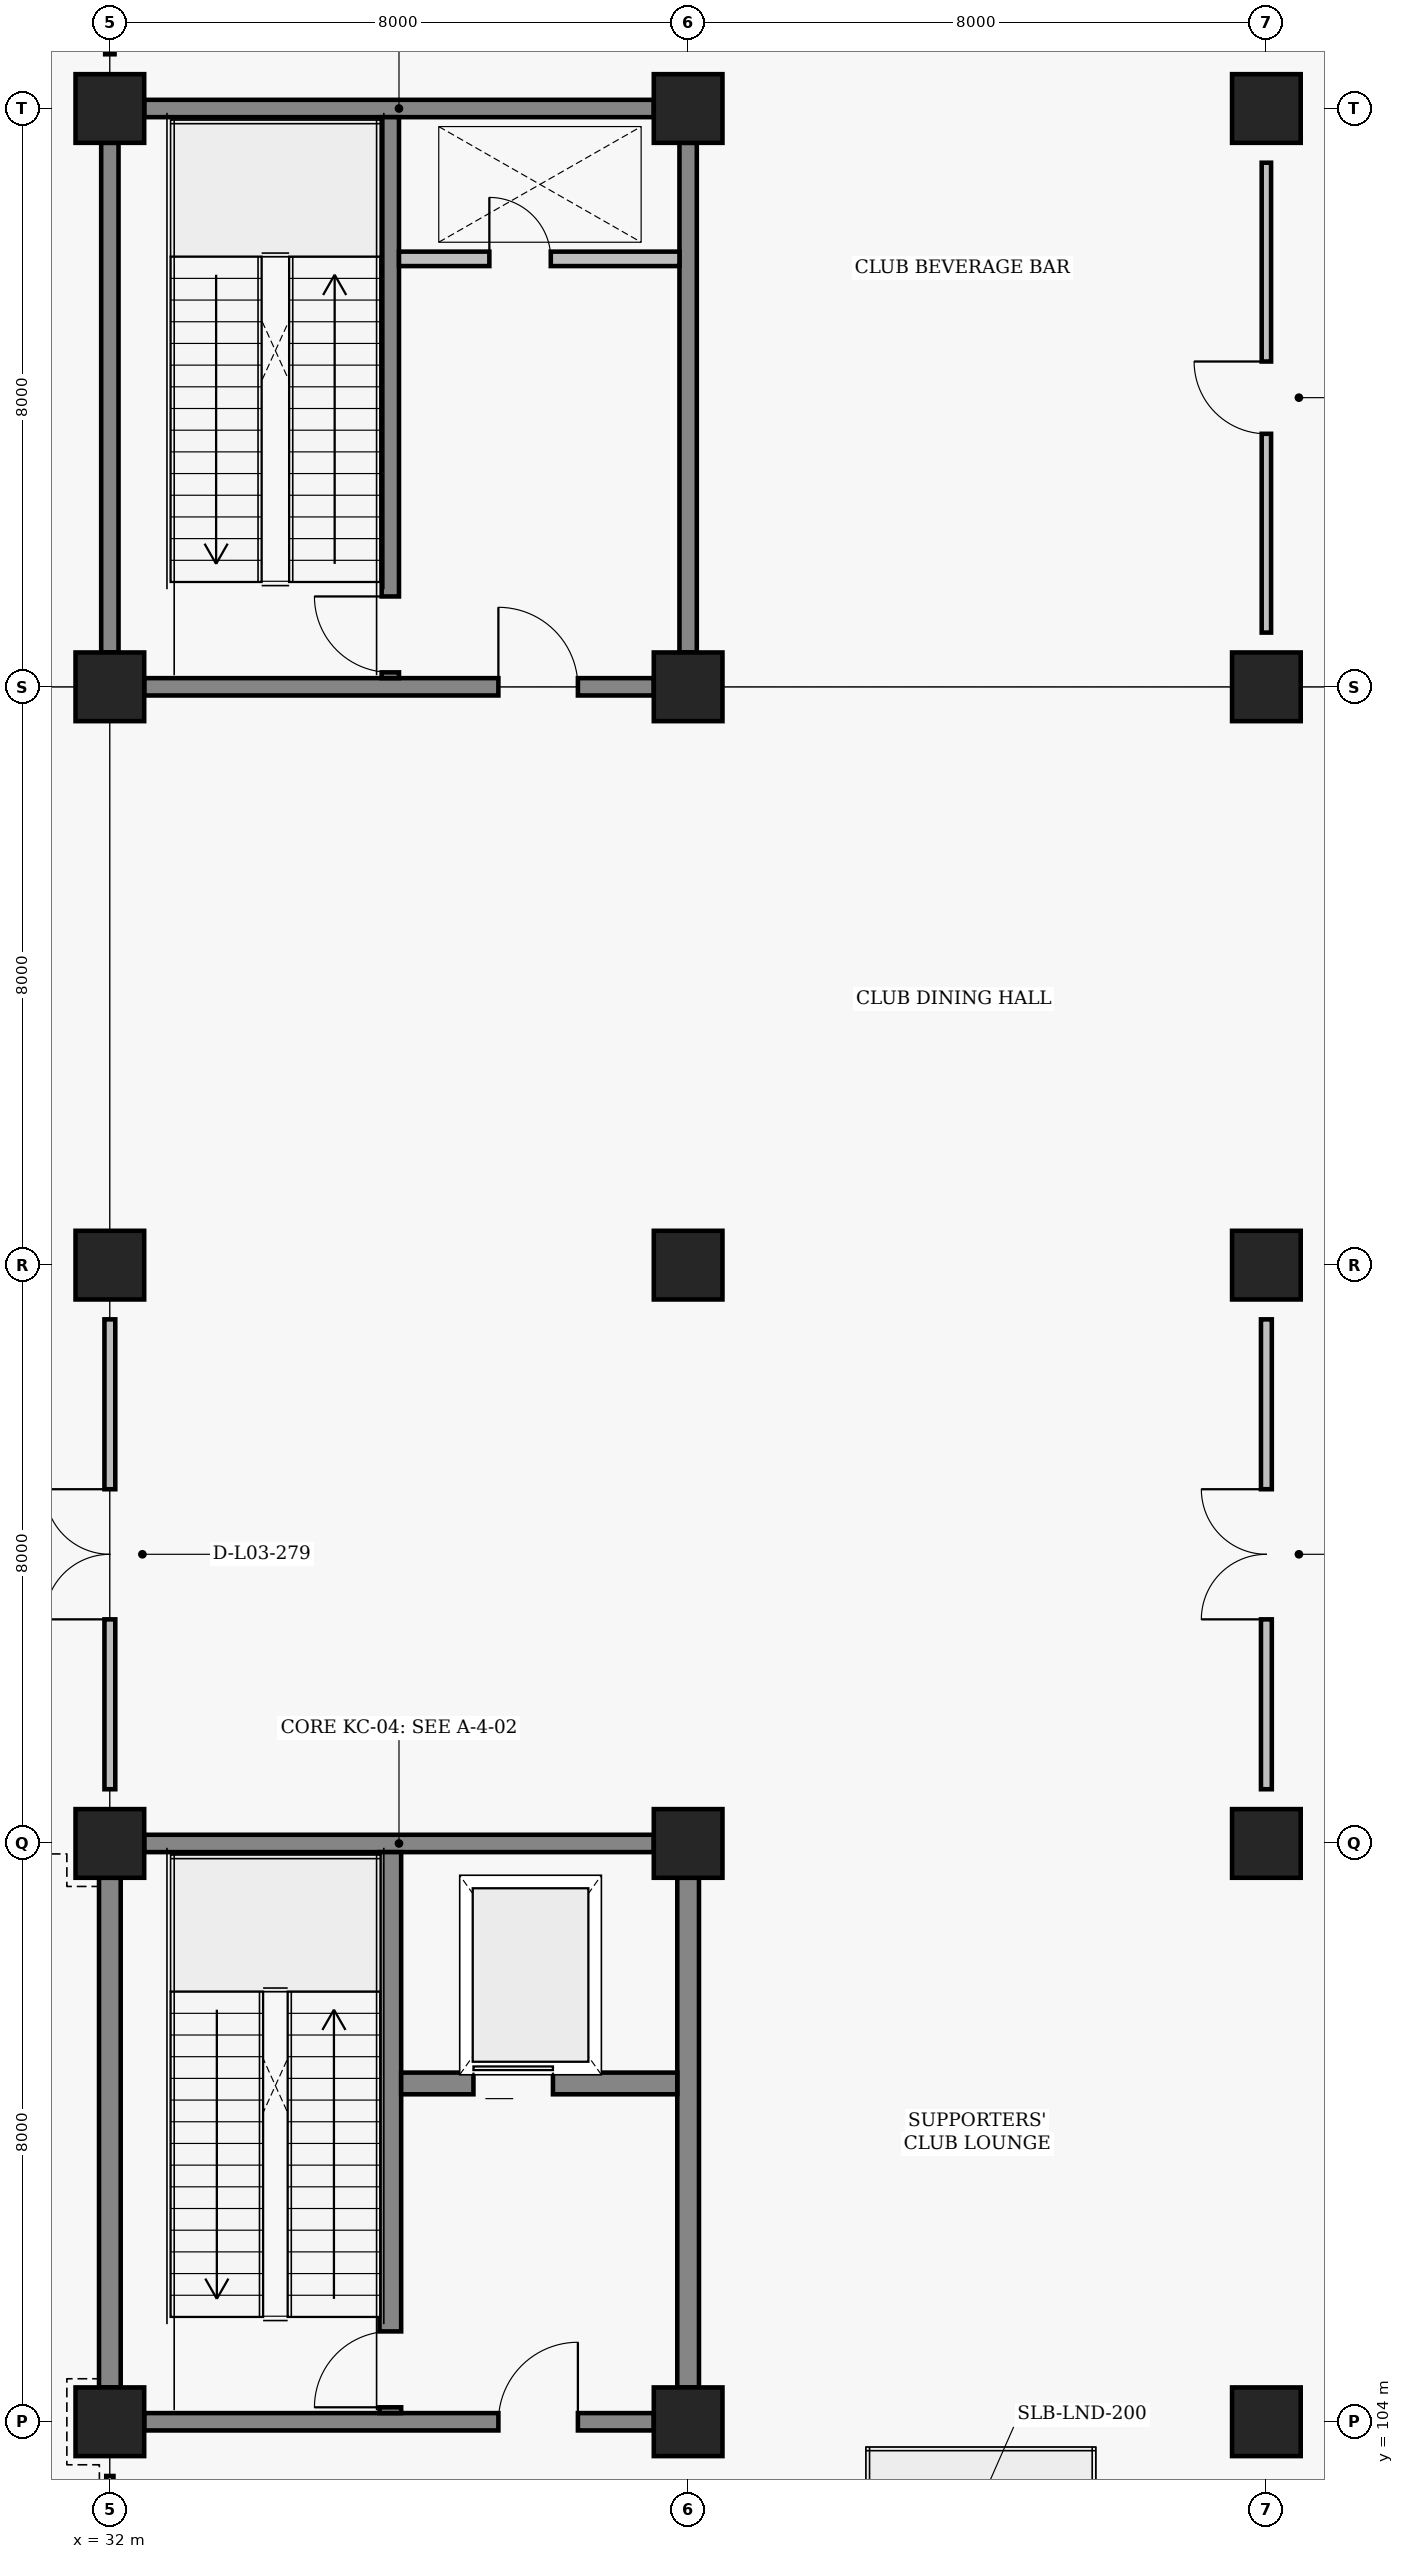
"""IFC4 building model, lengths in metres.
Left out: names, types, materials, properties, quantities, classifications, styles, units other than length and angle.
Written with IfcOpenShell. Run it as: python <this file> out.ifc"""

import sys

from ifc_helpers import new_model, si_unit, direction, frame, frame_2d, origin, origin_2d, place, context, subcontext, project, spatial, rectangle, extrude, element, fill, save


model = new_model("IFC4")
c1 = context("Model", 3, precision=1e-05, world=origin(), true_north=direction((0.0, 1.0)))
c2 = subcontext(c1, "Body", "Model", "MODEL_VIEW")
j1 = project(units=[si_unit("LENGTHUNIT", "METRE"), si_unit("PLANEANGLEUNIT", "RADIAN")], contexts=[c1])
p1 = place(None, origin())
s1 = spatial("IfcSite", under=j1, at=p1, CompositionType="ELEMENT")
p2 = place(p1, origin())
s2 = spatial("IfcBuilding", under=s1, at=p2, CompositionType="ELEMENT")
p3 = place(p2, frame((0.0, 0.0, 9.6)))
s3 = spatial("IfcBuildingStorey", under=s2, at=p3, CompositionType="ELEMENT", Elevation=9.6)
for number, where, z_axis, x_axis in (
    (1, (32.0, 104.0, 0.0), (0.0, 0.0, 1.0), (1.0, 0.0, 0.0)),
    (2, (32.0, 112.0, 0.0), (0.0, 0.0, 1.0), (1.0, 0.0, 0.0)),
    (3, (32.0, 120.0, 0.0), (0.0, 0.0, 1.0), (1.0, 0.0, 0.0)),
    (4, (32.0, 128.0, 0.0), (0.0, 0.0, 1.0), (1.0, 0.0, 0.0)),
    (5, (32.0, 136.0, 0.0), (0.0, 0.0, 1.0), (1.0, 0.0, 0.0)),
    (6, (40.0, 104.0, 0.0), (0.0, 0.0, 1.0), (1.0, 0.0, 0.0)),
    (7, (40.0, 112.0, 0.0), (0.0, 0.0, 1.0), (1.0, 0.0, 0.0)),
    (8, (40.0, 120.0, 0.0), (0.0, 0.0, 1.0), (1.0, 0.0, 0.0)),
    (9, (40.0, 128.0, 0.0), (0.0, 0.0, 1.0), (1.0, 0.0, 0.0)),
    (10, (40.0, 136.0, 0.0), (0.0, 0.0, 1.0), (1.0, 0.0, 0.0)),
    (11, (48.0, 104.0, 0.0), (0.0, 0.0, 1.0), (1.0, 0.0, 0.0)),
    (12, (48.0, 112.0, 0.0), (0.0, 0.0, 1.0), (1.0, 0.0, 0.0)),
    (13, (48.0, 120.0, 0.0), (0.0, 0.0, 1.0), (1.0, 0.0, 0.0)),
    (14, (48.0, 128.0, 0.0), (0.0, 0.0, 1.0), (1.0, 0.0, 0.0)),
    (15, (48.0, 136.0, 0.0), (0.0, 0.0, 1.0), (1.0, 0.0, 0.0)),
):
    element("IfcColumn", number, at=place(p3, frame(where, z_axis=z_axis, x_axis=x_axis)), inside=s3, PredefinedType="COLUMN", context=c2, shape_type="SweptSolid", body=[
        extrude(rectangle(XDim=0.95, YDim=0.95, at=origin_2d()), origin(), (0.0, 0.0, 1.0), 4.8),
    ])
p4 = place(p3, frame((32.475, 104.0, 0.0), z_axis=(0.0, 0.0, 1.0), x_axis=(1.0, 0.0, 0.0)))
e16 = element("IfcWall", 16, at=p4, inside=s3, PredefinedType="SHEAR", context=c2, shape_type="SweptSolid", body=[
    extrude(rectangle(XDim=7.05, YDim=0.24, at=frame_2d((3.525, 0.0))), origin(), (0.0, 0.0, 1.0), 3.68),
])
p5 = place(p4, frame((4.9, 0.0, 0.0)))
e17 = element("IfcOpeningElement", 17, at=p5, cuts=e16, PredefinedType="OPENING", context=c2, shape_type="SweptSolid", body=[
    extrude(rectangle(XDim=1.1, YDim=2.2, at=frame_2d((0.55, 1.1))), frame((0.0, 0.13, 0.0), z_axis=(0.0, -1.0, 0.0), x_axis=(1.0, 0.0, 0.0)), (0.0, 0.0, 1.0), 0.26),
])
p6 = place(p3, frame((32.475, 112.0, 0.0), z_axis=(0.0, 0.0, 1.0), x_axis=(1.0, 0.0, 0.0)))
e18 = element("IfcWall", 18, at=p6, inside=s3, PredefinedType="SHEAR", context=c2, shape_type="SweptSolid", body=[
    extrude(rectangle(XDim=7.05, YDim=0.24, at=frame_2d((3.525, 0.0))), origin(), (0.0, 0.0, 1.0), 3.93),
])
p7 = place(p3, frame((32.0, 104.475, 0.0), z_axis=(0.0, 0.0, 1.0), x_axis=(0.0, 1.0, 0.0)))
e19 = element("IfcWall", 19, at=p7, inside=s3, PredefinedType="SHEAR", context=c2, shape_type="SweptSolid", body=[
    extrude(rectangle(XDim=7.05, YDim=0.3, at=frame_2d((3.525, 0.0))), origin(), (0.0, 0.0, 1.0), 3.68),
])
p8 = place(p3, frame((40.0, 104.475, 0.0), z_axis=(0.0, 0.0, 1.0), x_axis=(0.0, 1.0, 0.0)))
e20 = element("IfcWall", 20, at=p8, inside=s3, PredefinedType="SHEAR", context=c2, shape_type="SweptSolid", body=[
    extrude(rectangle(XDim=7.05, YDim=0.3, at=frame_2d((3.525, 0.0))), origin(), (0.0, 0.0, 1.0), 3.93),
])
p9 = place(p3, frame((35.88, 104.12, 0.0), z_axis=(0.0, 0.0, 1.0), x_axis=(0.0, 1.0, 0.0)))
e21 = element("IfcWall", 21, at=p9, inside=s3, PredefinedType="SHEAR", context=c2, shape_type="SweptSolid", body=[
    extrude(rectangle(XDim=7.76, YDim=0.3, at=frame_2d((3.88, 0.0))), origin(), (0.0, 0.0, 1.0), 4.03),
])
p10 = place(p9, frame((0.08, 0.0, 0.0)))
e22 = element("IfcOpeningElement", 22, at=p10, cuts=e21, PredefinedType="OPENING", context=c2, shape_type="SweptSolid", body=[
    extrude(rectangle(XDim=1.05, YDim=2.15, at=frame_2d((0.525, 1.075))), frame((0.0, 0.16, 0.0), z_axis=(0.0, -1.0, 0.0), x_axis=(1.0, 0.0, 0.0)), (0.0, 0.0, 1.0), 0.32),
])
p11 = place(p3, frame((36.03, 108.68, 0.0), z_axis=(0.0, 0.0, 1.0), x_axis=(1.0, 0.0, 0.0)))
e23 = element("IfcWall", 23, at=p11, inside=s3, PredefinedType="SHEAR", context=c2, shape_type="SweptSolid", body=[
    extrude(rectangle(XDim=3.82, YDim=0.3, at=frame_2d((1.91, 0.0))), origin(), (0.0, 0.0, 1.0), 3.93),
])
p12 = place(p11, frame((1.0, 0.0, 0.0)))
e24 = element("IfcOpeningElement", 24, at=p12, cuts=e23, PredefinedType="OPENING", context=c2, shape_type="SweptSolid", body=[
    extrude(rectangle(XDim=1.1, YDim=2.15, at=frame_2d((0.55, 1.075))), frame((0.0, 0.16, 0.0), z_axis=(0.0, -1.0, 0.0), x_axis=(1.0, 0.0, 0.0)), (0.0, 0.0, 1.0), 0.32),
])
p13 = place(p3, frame((32.475, 128.0, 0.0), z_axis=(0.0, 0.0, 1.0), x_axis=(1.0, 0.0, 0.0)))
e25 = element("IfcWall", 25, at=p13, inside=s3, PredefinedType="SHEAR", context=c2, shape_type="SweptSolid", body=[
    extrude(rectangle(XDim=7.05, YDim=0.24, at=frame_2d((3.525, 0.0))), origin(), (0.0, 0.0, 1.0), 3.93),
])
p14 = place(p13, frame((4.9, 0.0, 0.0)))
e26 = element("IfcOpeningElement", 26, at=p14, cuts=e25, PredefinedType="OPENING", context=c2, shape_type="SweptSolid", body=[
    extrude(rectangle(XDim=1.1, YDim=2.2, at=frame_2d((0.55, 1.1))), frame((0.0, 0.13, 0.0), z_axis=(0.0, -1.0, 0.0), x_axis=(1.0, 0.0, 0.0)), (0.0, 0.0, 1.0), 0.26),
])
for number, where, z_axis, x_axis in (
    (27, (32.475, 136.0, 0.0), (0.0, 0.0, 1.0), (1.0, 0.0, 0.0)),
    (28, (32.0, 128.475, 0.0), (0.0, 0.0, 1.0), (0.0, 1.0, 0.0)),
    (29, (40.0, 128.475, 0.0), (0.0, 0.0, 1.0), (0.0, 1.0, 0.0)),
):
    element("IfcWall", number, at=place(p3, frame(where, z_axis=z_axis, x_axis=x_axis)), inside=s3, PredefinedType="SHEAR", context=c2, shape_type="SweptSolid", body=[
        extrude(rectangle(XDim=7.05, YDim=0.24, at=frame_2d((3.525, 0.0))), origin(), (0.0, 0.0, 1.0), 3.93),
    ])
p15 = place(p3, frame((35.88, 128.12, 0.0), z_axis=(0.0, 0.0, 1.0), x_axis=(0.0, 1.0, 0.0)))
e30 = element("IfcWall", 30, at=p15, inside=s3, PredefinedType="SHEAR", context=c2, shape_type="SweptSolid", body=[
    extrude(rectangle(XDim=7.76, YDim=0.24, at=frame_2d((3.88, 0.0))), origin(), (0.0, 0.0, 1.0), 4.03),
])
p16 = place(p15, frame((0.08, 0.0, 0.0)))
e31 = element("IfcOpeningElement", 31, at=p16, cuts=e30, PredefinedType="OPENING", context=c2, shape_type="SweptSolid", body=[
    extrude(rectangle(XDim=1.05, YDim=2.15, at=frame_2d((0.525, 1.075))), frame((0.0, 0.13, 0.0), z_axis=(0.0, -1.0, 0.0), x_axis=(1.0, 0.0, 0.0)), (0.0, 0.0, 1.0), 0.26),
])
p17 = place(p3, frame((36.0, 133.92, 0.0), z_axis=(0.0, 0.0, 1.0), x_axis=(1.0, 0.0, 0.0)))
e32 = element("IfcWall", 32, at=p17, inside=s3, PredefinedType="PARTITIONING", context=c2, shape_type="SweptSolid", body=[
    extrude(rectangle(XDim=3.88, YDim=0.2, at=frame_2d((1.94, 0.0))), origin(), (0.0, 0.0, 1.0), 3.93),
])
p18 = place(p17, frame((1.25, 0.0, 0.0)))
e33 = element("IfcOpeningElement", 33, at=p18, cuts=e32, PredefinedType="OPENING", context=c2, shape_type="SweptSolid", body=[
    extrude(rectangle(XDim=0.85, YDim=2.05, at=frame_2d((0.425, 1.025))), frame((0.0, 0.11, 0.0), z_axis=(0.0, -1.0, 0.0), x_axis=(1.0, 0.0, 0.0)), (0.0, 0.0, 1.0), 0.22),
])
p19 = place(p3, frame((32.0, 96.75, 0.0), z_axis=(0.0, 0.0, 1.0), x_axis=(0.0, 1.0, 0.0)))
e34 = element("IfcWall", 34, at=p19, inside=s3, PredefinedType="PARTITIONING", context=c2, shape_type="SweptSolid", body=[
    extrude(rectangle(XDim=6.5, YDim=0.1, at=frame_2d((3.25, 0.0))), origin(), (0.0, 0.0, 1.0), 3.93),
])
p20 = place(p19, frame((2.775, 0.0, 0.0)))
e35 = element("IfcOpeningElement", 35, at=p20, cuts=e34, PredefinedType="OPENING", context=c2, shape_type="SweptSolid", body=[
    extrude(rectangle(XDim=0.95, YDim=2.1, at=frame_2d((0.475, 1.05))), frame((0.0, 0.06, 0.0), z_axis=(0.0, -1.0, 0.0), x_axis=(1.0, 0.0, 0.0)), (0.0, 0.0, 1.0), 0.12),
])
p21 = place(p3, frame((32.0, 112.75, 0.0), z_axis=(0.0, 0.0, 1.0), x_axis=(0.0, 1.0, 0.0)))
e36 = element("IfcWall", 36, at=p21, inside=s3, PredefinedType="PARTITIONING", context=c2, shape_type="SweptSolid", body=[
    extrude(rectangle(XDim=6.5, YDim=0.15, at=frame_2d((3.25, 0.0))), origin(), (0.0, 0.0, 1.0), 3.93),
])
p22 = place(p21, frame((2.35, 0.0, 0.0)))
e37 = element("IfcOpeningElement", 37, at=p22, cuts=e36, PredefinedType="OPENING", context=c2, shape_type="SweptSolid", body=[
    extrude(rectangle(XDim=1.8, YDim=2.3, at=frame_2d((0.9, 1.15))), frame((0.0, 0.085, 0.0), z_axis=(0.0, -1.0, 0.0), x_axis=(1.0, 0.0, 0.0)), (0.0, 0.0, 1.0), 0.17),
])
p23 = place(p3, frame((32.0, 136.75, 0.0), z_axis=(0.0, 0.0, 1.0), x_axis=(0.0, 1.0, 0.0)))
e38 = element("IfcWall", 38, at=p23, inside=s3, PredefinedType="PARTITIONING", context=c2, shape_type="SweptSolid", body=[
    extrude(rectangle(XDim=6.5, YDim=0.13, at=frame_2d((3.25, 0.0))), origin(), (0.0, 0.0, 1.0), 3.93),
])
p24 = place(p23, frame((2.75, 0.0, 0.0)))
e39 = element("IfcOpeningElement", 39, at=p24, cuts=e38, PredefinedType="OPENING", context=c2, shape_type="SweptSolid", body=[
    extrude(rectangle(XDim=1.0, YDim=2.1, at=frame_2d((0.5, 1.05))), frame((0.0, 0.075, 0.0), z_axis=(0.0, -1.0, 0.0), x_axis=(1.0, 0.0, 0.0)), (0.0, 0.0, 1.0), 0.15),
])
p25 = place(p3, frame((48.0, 112.75, 0.0), z_axis=(0.0, 0.0, 1.0), x_axis=(0.0, 1.0, 0.0)))
e40 = element("IfcWall", 40, at=p25, inside=s3, PredefinedType="PARTITIONING", context=c2, shape_type="SweptSolid", body=[
    extrude(rectangle(XDim=6.5, YDim=0.15, at=frame_2d((3.25, 0.0))), origin(), (0.0, 0.0, 1.0), 3.93),
])
p26 = place(p25, frame((2.35, 0.0, 0.0)))
e41 = element("IfcOpeningElement", 41, at=p26, cuts=e40, PredefinedType="OPENING", context=c2, shape_type="SweptSolid", body=[
    extrude(rectangle(XDim=1.8, YDim=2.3, at=frame_2d((0.9, 1.15))), frame((0.0, 0.085, 0.0), z_axis=(0.0, -1.0, 0.0), x_axis=(1.0, 0.0, 0.0)), (0.0, 0.0, 1.0), 0.17),
])
p27 = place(p3, frame((48.0, 128.75, 0.0), z_axis=(0.0, 0.0, 1.0), x_axis=(0.0, 1.0, 0.0)))
e42 = element("IfcWall", 42, at=p27, inside=s3, PredefinedType="PARTITIONING", context=c2, shape_type="SweptSolid", body=[
    extrude(rectangle(XDim=6.5, YDim=0.13, at=frame_2d((3.25, 0.0))), origin(), (0.0, 0.0, 1.0), 3.93),
])
p28 = place(p27, frame((2.75, 0.0, 0.0)))
e43 = element("IfcOpeningElement", 43, at=p28, cuts=e42, PredefinedType="OPENING", context=c2, shape_type="SweptSolid", body=[
    extrude(rectangle(XDim=1.0, YDim=2.1, at=frame_2d((0.5, 1.05))), frame((0.0, 0.075, 0.0), z_axis=(0.0, -1.0, 0.0), x_axis=(1.0, 0.0, 0.0)), (0.0, 0.0, 1.0), 0.15),
])
p29 = place(p5, origin())
e44 = element("IfcDoor", 44, at=p29, inside=s3, OperationType="SINGLE_SWING_RIGHT", PredefinedType="DOOR", context=c2, shape_type="SweptSolid", body=[
    extrude(rectangle(XDim=1.1, YDim=2.2, at=frame_2d((0.55, 1.1))), frame((0.0, 0.025, 0.0), z_axis=(0.0, -1.0, 0.0), x_axis=(1.0, 0.0, 0.0)), (0.0, 0.0, 1.0), 0.05),
])
fill(e17, e44)
p30 = place(p10, origin())
e45 = element("IfcDoor", 45, at=p30, inside=s3, OperationType="SINGLE_SWING_LEFT", PredefinedType="DOOR", context=c2, shape_type="SweptSolid", body=[
    extrude(rectangle(XDim=1.05, YDim=2.15, at=frame_2d((0.525, 1.075))), frame((0.0, 0.025, 0.0), z_axis=(0.0, -1.0, 0.0), x_axis=(1.0, 0.0, 0.0)), (0.0, 0.0, 1.0), 0.05),
])
fill(e22, e45)
p31 = place(p12, origin())
e46 = element("IfcDoor", 46, at=p31, inside=s3, OperationType="SLIDING_TO_LEFT", PredefinedType="DOOR", context=c2, shape_type="SweptSolid", body=[
    extrude(rectangle(XDim=1.1, YDim=2.15, at=frame_2d((0.55, 1.075))), frame((0.0, 0.025, 0.0), z_axis=(0.0, -1.0, 0.0), x_axis=(1.0, 0.0, 0.0)), (0.0, 0.0, 1.0), 0.05),
])
fill(e24, e46)
p32 = place(p14, origin())
e47 = element("IfcDoor", 47, at=p32, inside=s3, OperationType="SINGLE_SWING_LEFT", PredefinedType="DOOR", context=c2, shape_type="SweptSolid", body=[
    extrude(rectangle(XDim=1.1, YDim=2.2, at=frame_2d((0.55, 1.1))), frame((0.0, 0.025, 0.0), z_axis=(0.0, -1.0, 0.0), x_axis=(1.0, 0.0, 0.0)), (0.0, 0.0, 1.0), 0.05),
])
fill(e26, e47)
p33 = place(p16, origin())
e48 = element("IfcDoor", 48, at=p33, inside=s3, OperationType="SINGLE_SWING_RIGHT", PredefinedType="DOOR", context=c2, shape_type="SweptSolid", body=[
    extrude(rectangle(XDim=1.05, YDim=2.15, at=frame_2d((0.525, 1.075))), frame((0.0, 0.025, 0.0), z_axis=(0.0, -1.0, 0.0), x_axis=(1.0, 0.0, 0.0)), (0.0, 0.0, 1.0), 0.05),
])
fill(e31, e48)
p34 = place(p18, origin())
e49 = element("IfcDoor", 49, at=p34, inside=s3, OperationType="SINGLE_SWING_LEFT", PredefinedType="TRAPDOOR", context=c2, shape_type="SweptSolid", body=[
    extrude(rectangle(XDim=0.85, YDim=2.05, at=frame_2d((0.425, 1.025))), frame((0.0, 0.025, 0.0), z_axis=(0.0, -1.0, 0.0), x_axis=(1.0, 0.0, 0.0)), (0.0, 0.0, 1.0), 0.05),
])
fill(e33, e49)
p35 = place(p22, origin())
e50 = element("IfcDoor", 50, at=p35, inside=s3, OperationType="DOUBLE_SWING_LEFT", PredefinedType="DOOR", context=c2, shape_type="SweptSolid", body=[
    extrude(rectangle(XDim=1.8, YDim=2.3, at=frame_2d((0.9, 1.15))), frame((0.0, 0.025, 0.0), z_axis=(0.0, -1.0, 0.0), x_axis=(1.0, 0.0, 0.0)), (0.0, 0.0, 1.0), 0.05),
])
fill(e37, e50)
p36 = place(p26, origin())
e51 = element("IfcDoor", 51, at=p36, inside=s3, OperationType="DOUBLE_SWING_LEFT", PredefinedType="DOOR", context=c2, shape_type="SweptSolid", body=[
    extrude(rectangle(XDim=1.8, YDim=2.3, at=frame_2d((0.9, 1.15))), frame((0.0, 0.025, 0.0), z_axis=(0.0, -1.0, 0.0), x_axis=(1.0, 0.0, 0.0)), (0.0, 0.0, 1.0), 0.05),
])
fill(e41, e51)
p37 = place(p28, origin())
e52 = element("IfcDoor", 52, at=p37, inside=s3, OperationType="SINGLE_SWING_RIGHT", PredefinedType="DOOR", context=c2, shape_type="SweptSolid", body=[
    extrude(rectangle(XDim=1.0, YDim=2.1, at=frame_2d((0.5, 1.05))), frame((0.0, 0.025, 0.0), z_axis=(0.0, -1.0, 0.0), x_axis=(1.0, 0.0, 0.0)), (0.0, 0.0, 1.0), 0.05),
])
fill(e43, e52)
save(model, sys.argv[1])
